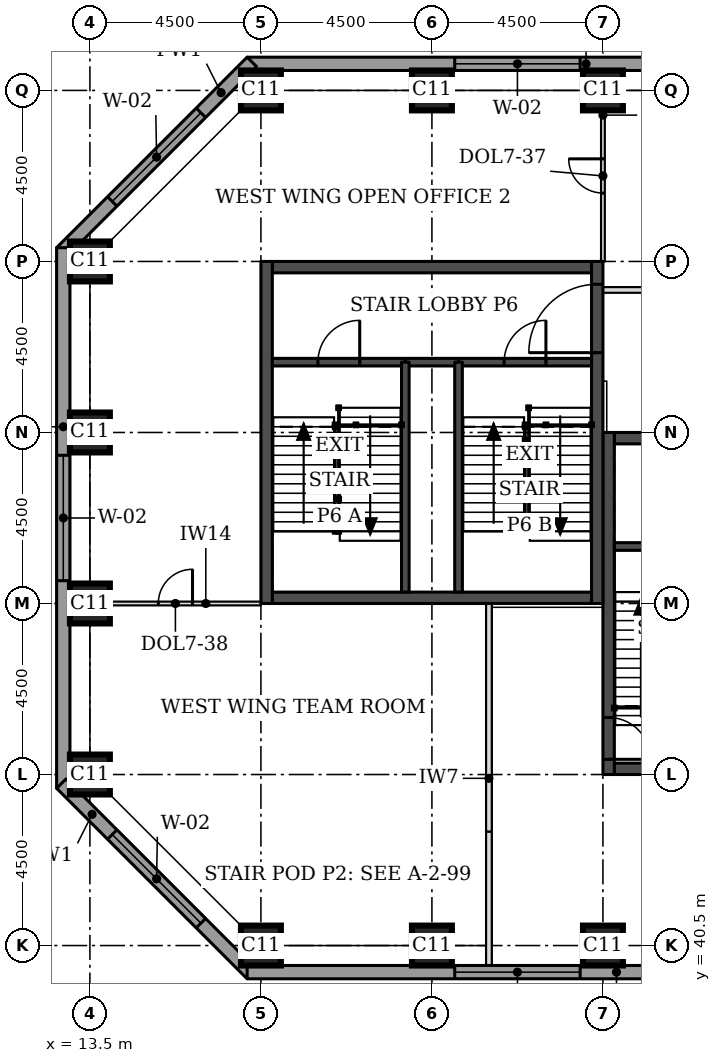
"""IFC4 building model, lengths in metres.
Left out: names, types, materials, properties, quantities, classifications, styles, units other than length and angle.
Written with IfcOpenShell. Run it as: python <this file> out.ifc"""

import sys

from ifc_helpers import new_model, si_unit, direction, frame, frame_2d, origin, origin_2d, place, context, subcontext, project, spatial, rectangle, extrude, element, fill, save


model = new_model("IFC4")
c1 = context("Model", 3, precision=1e-05, world=origin(), true_north=direction((0.0, 1.0)))
c2 = subcontext(c1, "Body", "Model", "MODEL_VIEW")
j1 = project(units=[si_unit("LENGTHUNIT", "METRE"), si_unit("PLANEANGLEUNIT", "RADIAN")], contexts=[c1])
p1 = place(None, origin())
s1 = spatial("IfcSite", under=j1, at=p1, CompositionType="ELEMENT")
p2 = place(p1, origin())
s2 = spatial("IfcBuilding", under=s1, at=p2, CompositionType="ELEMENT")
p3 = place(p2, frame((0.0, 0.0, 130.7)))
s3 = spatial("IfcBuildingStorey", under=s2, at=p3, CompositionType="ELEMENT", Elevation=130.7)
for number, where, z_axis, x_axis in (
    (1, (18.0, 40.5, 0.0), (0.0, 0.0, 1.0), (1.0, 0.0, 0.0)),
    (2, (22.5, 40.5, 0.0), (0.0, 0.0, 1.0), (1.0, 0.0, 0.0)),
    (3, (27.0, 40.5, 0.0), (0.0, 0.0, 1.0), (1.0, 0.0, 0.0)),
    (4, (13.5, 45.0, 0.0), (0.0, 0.0, 1.0), (1.0, 0.0, 0.0)),
    (5, (13.5, 49.5, 0.0), (0.0, 0.0, 1.0), (1.0, 0.0, 0.0)),
    (6, (13.5, 54.0, 0.0), (0.0, 0.0, 1.0), (1.0, 0.0, 0.0)),
    (7, (13.5, 58.5, 0.0), (0.0, 0.0, 1.0), (1.0, 0.0, 0.0)),
    (8, (18.0, 63.0, 0.0), (0.0, 0.0, 1.0), (1.0, 0.0, 0.0)),
    (9, (22.5, 63.0, 0.0), (0.0, 0.0, 1.0), (1.0, 0.0, 0.0)),
    (10, (27.0, 63.0, 0.0), (0.0, 0.0, 1.0), (1.0, 0.0, 0.0)),
):
    element("IfcColumn", number, at=place(p3, frame(where, z_axis=z_axis, x_axis=x_axis)), inside=s3, PredefinedType="COLUMN", context=c2, shape_type="SweptSolid", body=[
        extrude(rectangle(XDim=1.05, YDim=1.05, at=origin_2d()), origin(), (0.0, 0.0, 1.0), 3.7),
    ])
p4 = place(p3, frame((27.3, 45.15, 0.0), z_axis=(0.0, 0.0, 1.0), x_axis=(1.0, 0.0, 0.0)))
e11 = element("IfcWall", 11, at=p4, inside=s3, PredefinedType="SHEAR", context=c2, shape_type="SweptSolid", body=[
    extrude(rectangle(XDim=8.4, YDim=0.3, at=frame_2d((4.2, 0.0))), origin(), (0.0, 0.0, 1.0), 3.7),
])
p5 = place(p4, frame((5.2, 0.0, 0.0)))
e12 = element("IfcOpeningElement", 12, at=p5, cuts=e11, PredefinedType="OPENING", context=c2, shape_type="SweptSolid", body=[
    extrude(rectangle(XDim=1.0, YDim=2.1, at=frame_2d((0.5, 1.05))), frame((0.0, 0.16, 0.0), z_axis=(0.0, -1.0, 0.0), x_axis=(1.0, 0.0, 0.0)), (0.0, 0.0, 1.0), 0.32),
])
p6 = place(p3, frame((27.3, 53.85, 0.0), z_axis=(0.0, 0.0, 1.0), x_axis=(1.0, 0.0, 0.0)))
e13 = element("IfcWall", 13, at=p6, inside=s3, PredefinedType="SHEAR", context=c2, shape_type="SweptSolid", body=[
    extrude(rectangle(XDim=8.4, YDim=0.3, at=frame_2d((4.2, 0.0))), origin(), (0.0, 0.0, 1.0), 3.7),
])
p7 = place(p6, frame((6.4, 0.0, 0.0)))
e14 = element("IfcOpeningElement", 14, at=p7, cuts=e13, PredefinedType="OPENING", context=c2, shape_type="SweptSolid", body=[
    extrude(rectangle(XDim=1.1, YDim=2.1, at=frame_2d((0.55, 1.05))), frame((0.0, 0.16, 0.0), z_axis=(0.0, -1.0, 0.0), x_axis=(1.0, 0.0, 0.0)), (0.0, 0.0, 1.0), 0.32),
])
p8 = place(p3, frame((27.15, 45.0, 0.0), z_axis=(0.0, 0.0, 1.0), x_axis=(0.0, 1.0, 0.0)))
e15 = element("IfcWall", 15, at=p8, inside=s3, PredefinedType="SHEAR", context=c2, shape_type="SweptSolid", body=[
    extrude(rectangle(XDim=9.0, YDim=0.3, at=frame_2d((4.5, 0.0))), origin(), (0.0, 0.0, 1.0), 3.7),
])
p9 = place(p8, frame((0.4, 0.0, 0.0)))
e16 = element("IfcOpeningElement", 16, at=p9, cuts=e15, PredefinedType="OPENING", context=c2, shape_type="SweptSolid", body=[
    extrude(rectangle(XDim=1.1, YDim=2.1, at=frame_2d((0.55, 1.05))), frame((0.0, 0.16, 0.0), z_axis=(0.0, -1.0, 0.0), x_axis=(1.0, 0.0, 0.0)), (0.0, 0.0, 1.0), 0.32),
])
for number, where, z_axis, x_axis in (
    (17, (18.3, 49.65, 0.0), (0.0, 0.0, 1.0), (1.0, 0.0, 0.0)),
    (18, (18.3, 58.35, 0.0), (0.0, 0.0, 1.0), (1.0, 0.0, 0.0)),
):
    element("IfcWall", number, at=place(p3, frame(where, z_axis=z_axis, x_axis=x_axis)), inside=s3, PredefinedType="SHEAR", context=c2, shape_type="SweptSolid", body=[
        extrude(rectangle(XDim=8.4, YDim=0.3, at=frame_2d((4.2, 0.0))), origin(), (0.0, 0.0, 1.0), 3.7),
    ])
p10 = place(p3, frame((18.15, 49.5, 0.0), z_axis=(0.0, 0.0, 1.0), x_axis=(0.0, 1.0, 0.0)))
e19 = element("IfcWall", 19, at=p10, inside=s3, PredefinedType="SHEAR", context=c2, shape_type="SweptSolid", body=[
    extrude(rectangle(XDim=9.0, YDim=0.3, at=frame_2d((4.5, 0.0))), origin(), (0.0, 0.0, 1.0), 3.7),
])
p11 = place(p3, frame((26.85, 49.5, 0.0), z_axis=(0.0, 0.0, 1.0), x_axis=(0.0, 1.0, 0.0)))
e20 = element("IfcWall", 20, at=p11, inside=s3, PredefinedType="SHEAR", context=c2, shape_type="SweptSolid", body=[
    extrude(rectangle(XDim=9.0, YDim=0.3, at=frame_2d((4.5, 0.0))), origin(), (0.0, 0.0, 1.0), 3.7),
])
p12 = place(p11, frame((6.6, 0.0, 0.0)))
e21 = element("IfcOpeningElement", 21, at=p12, cuts=e20, PredefinedType="OPENING", context=c2, shape_type="SweptSolid", body=[
    extrude(rectangle(XDim=1.8, YDim=2.1, at=frame_2d((0.9, 1.05))), frame((0.0, 0.16, 0.0), z_axis=(0.0, -1.0, 0.0), x_axis=(1.0, 0.0, 0.0)), (0.0, 0.0, 1.0), 0.32),
])
p13 = place(p3, frame((35.475, 63.7, 0.0), z_axis=(0.0, 0.0, 1.0), x_axis=(-1.0, 0.0, 0.0)))
e22 = element("IfcWall", 22, at=p13, inside=s3, PredefinedType="STANDARD", context=c2, shape_type="SweptSolid", body=[
    extrude(rectangle(XDim=17.837, YDim=0.35, at=frame_2d((8.919, 0.0))), origin(), (0.0, 0.0, 1.0), 3.525),
])
p14 = place(p13, frame((0.5, 0.0, 0.9)))
e23 = element("IfcOpeningElement", 23, at=p14, cuts=e22, PredefinedType="OPENING", context=c2, shape_type="SweptSolid", body=[
    extrude(rectangle(XDim=3.3, YDim=1.9, at=frame_2d((1.65, 0.95))), frame((0.0, 0.185, 0.0), z_axis=(0.0, -1.0, 0.0), x_axis=(1.0, 0.0, 0.0)), (0.0, 0.0, 1.0), 0.37),
])
p15 = place(p13, frame((9.075, 0.0, 0.9)))
e24 = element("IfcOpeningElement", 24, at=p15, cuts=e22, PredefinedType="OPENING", context=c2, shape_type="SweptSolid", body=[
    extrude(rectangle(XDim=3.3, YDim=1.9, at=frame_2d((1.65, 0.95))), frame((0.0, 0.185, 0.0), z_axis=(0.0, -1.0, 0.0), x_axis=(1.0, 0.0, 0.0)), (0.0, 0.0, 1.0), 0.37),
])
p16 = place(p3, frame((17.761, 63.751, 0.0), z_axis=(0.0, 0.0, 1.0), x_axis=(-0.707106781187, -0.707106781187, 0.0)))
e25 = element("IfcWall", 25, at=p16, inside=s3, PredefinedType="STANDARD", context=c2, shape_type="SweptSolid", body=[
    extrude(rectangle(XDim=7.089, YDim=0.35, at=frame_2d((3.544, 0.0))), origin(), (0.0, 0.0, 1.0), 3.525),
])
p17 = place(p16, frame((1.894, 0.0, 0.9)))
e26 = element("IfcOpeningElement", 26, at=p17, cuts=e25, PredefinedType="OPENING", context=c2, shape_type="SweptSolid", body=[
    extrude(rectangle(XDim=3.3, YDim=1.9, at=frame_2d((1.65, 0.95))), frame((0.0, 0.185, 0.0), z_axis=(0.0, -1.0, 0.0), x_axis=(1.0, 0.0, 0.0)), (0.0, 0.0, 1.0), 0.37),
])
p18 = place(p3, frame((12.8, 58.862, 0.0), z_axis=(0.0, 0.0, 1.0), x_axis=(0.0, -1.0, 0.0)))
e27 = element("IfcWall", 27, at=p18, inside=s3, PredefinedType="STANDARD", context=c2, shape_type="SweptSolid", body=[
    extrude(rectangle(XDim=14.225, YDim=0.35, at=frame_2d((7.112, 0.0))), origin(), (0.0, 0.0, 1.0), 3.525),
])
p19 = place(p18, frame((5.462, 0.0, 0.9)))
e28 = element("IfcOpeningElement", 28, at=p19, cuts=e27, PredefinedType="OPENING", context=c2, shape_type="SweptSolid", body=[
    extrude(rectangle(XDim=3.3, YDim=1.9, at=frame_2d((1.65, 0.95))), frame((0.0, 0.185, 0.0), z_axis=(0.0, -1.0, 0.0), x_axis=(1.0, 0.0, 0.0)), (0.0, 0.0, 1.0), 0.37),
])
p20 = place(p3, frame((12.749, 44.761, 0.0), z_axis=(0.0, 0.0, 1.0), x_axis=(0.707106781187, -0.707106781187, 0.0)))
e29 = element("IfcWall", 29, at=p20, inside=s3, PredefinedType="STANDARD", context=c2, shape_type="SweptSolid", body=[
    extrude(rectangle(XDim=7.089, YDim=0.35, at=frame_2d((3.544, 0.0))), origin(), (0.0, 0.0, 1.0), 3.525),
])
p21 = place(p20, frame((1.894, 0.0, 0.9)))
e30 = element("IfcOpeningElement", 30, at=p21, cuts=e29, PredefinedType="OPENING", context=c2, shape_type="SweptSolid", body=[
    extrude(rectangle(XDim=3.3, YDim=1.9, at=frame_2d((1.65, 0.95))), frame((0.0, 0.185, 0.0), z_axis=(0.0, -1.0, 0.0), x_axis=(1.0, 0.0, 0.0)), (0.0, 0.0, 1.0), 0.37),
])
p22 = place(p3, frame((17.638, 39.8, 0.0), z_axis=(0.0, 0.0, 1.0), x_axis=(1.0, 0.0, 0.0)))
e31 = element("IfcWall", 31, at=p22, inside=s3, PredefinedType="STANDARD", context=c2, shape_type="SweptSolid", body=[
    extrude(rectangle(XDim=17.837, YDim=0.35, at=frame_2d((8.919, 0.0))), origin(), (0.0, 0.0, 1.0), 3.525),
])
p23 = place(p22, frame((5.462, 0.0, 0.9)))
e32 = element("IfcOpeningElement", 32, at=p23, cuts=e31, PredefinedType="OPENING", context=c2, shape_type="SweptSolid", body=[
    extrude(rectangle(XDim=3.3, YDim=1.9, at=frame_2d((1.65, 0.95))), frame((0.0, 0.185, 0.0), z_axis=(0.0, -1.0, 0.0), x_axis=(1.0, 0.0, 0.0)), (0.0, 0.0, 1.0), 0.37),
])
p24 = place(p22, frame((14.037, 0.0, 0.9)))
e33 = element("IfcOpeningElement", 33, at=p24, cuts=e31, PredefinedType="OPENING", context=c2, shape_type="SweptSolid", body=[
    extrude(rectangle(XDim=3.3, YDim=1.9, at=frame_2d((1.65, 0.95))), frame((0.0, 0.185, 0.0), z_axis=(0.0, -1.0, 0.0), x_axis=(1.0, 0.0, 0.0)), (0.0, 0.0, 1.0), 0.37),
])
p25 = place(p3, frame((24.0, 39.975, 0.0), z_axis=(0.0, 0.0, 1.0), x_axis=(0.0, 1.0, 0.0)))
e34 = element("IfcWall", 34, at=p25, inside=s3, PredefinedType="PARTITIONING", context=c2, shape_type="SweptSolid", body=[
    extrude(rectangle(XDim=3.525, YDim=0.15, at=frame_2d((1.762, 0.0))), origin(), (0.0, 0.0, 1.0), 3.55),
])
p26 = place(p3, frame((24.0, 43.5, 0.0), z_axis=(0.0, 0.0, 1.0), x_axis=(0.0, 1.0, 0.0)))
e35 = element("IfcWall", 35, at=p26, inside=s3, PredefinedType="PARTITIONING", context=c2, shape_type="SweptSolid", body=[
    extrude(rectangle(XDim=6.0, YDim=0.15, at=frame_2d((3.0, 0.0))), origin(), (0.0, 0.0, 1.0), 3.55),
])
p27 = place(p3, frame((27.0, 63.0, 0.0), z_axis=(0.0, 0.0, 1.0), x_axis=(0.0, -1.0, 0.0)))
e36 = element("IfcWall", 36, at=p27, inside=s3, PredefinedType="PARTITIONING", context=c2, shape_type="SweptSolid", body=[
    extrude(rectangle(XDim=4.5, YDim=0.1, at=frame_2d((2.25, 0.0))), origin(), (0.0, 0.0, 1.0), 3.55),
])
p28 = place(p27, frame((1.8, 0.0, 0.0)))
e37 = element("IfcOpeningElement", 37, at=p28, cuts=e36, PredefinedType="OPENING", context=c2, shape_type="SweptSolid", body=[
    extrude(rectangle(XDim=0.9, YDim=2.1, at=frame_2d((0.45, 1.05))), frame((0.0, 0.06, 0.0), z_axis=(0.0, -1.0, 0.0), x_axis=(1.0, 0.0, 0.0)), (0.0, 0.0, 1.0), 0.12),
])
p29 = place(p3, frame((13.5, 49.5, 0.0), z_axis=(0.0, 0.0, 1.0), x_axis=(1.0, 0.0, 0.0)))
e38 = element("IfcWall", 38, at=p29, inside=s3, PredefinedType="PARTITIONING", context=c2, shape_type="SweptSolid", body=[
    extrude(rectangle(XDim=4.5, YDim=0.1, at=frame_2d((2.25, 0.0))), origin(), (0.0, 0.0, 1.0), 3.55),
])
p30 = place(p29, frame((1.8, 0.0, 0.0)))
e39 = element("IfcOpeningElement", 39, at=p30, cuts=e38, PredefinedType="OPENING", context=c2, shape_type="SweptSolid", body=[
    extrude(rectangle(XDim=0.9, YDim=2.1, at=frame_2d((0.45, 1.05))), frame((0.0, 0.06, 0.0), z_axis=(0.0, -1.0, 0.0), x_axis=(1.0, 0.0, 0.0)), (0.0, 0.0, 1.0), 0.12),
])
p31 = place(p3, frame((27.0, 57.75, 0.0), z_axis=(0.0, 0.0, 1.0), x_axis=(1.0, 0.0, 0.0)))
e40 = element("IfcWall", 40, at=p31, inside=s3, PredefinedType="PARTITIONING", context=c2, shape_type="SweptSolid", body=[
    extrude(rectangle(XDim=2.4, YDim=0.15, at=frame_2d((1.2, 0.0))), origin(), (0.0, 0.0, 1.0), 3.55),
])
p32 = place(p3, frame((27.3, 51.0, 0.0), z_axis=(0.0, 0.0, 1.0), x_axis=(1.0, 0.0, 0.0)))
e41 = element("IfcWall", 41, at=p32, inside=s3, PredefinedType="SOLIDWALL", context=c2, shape_type="SweptSolid", body=[
    extrude(rectangle(XDim=3.0, YDim=0.2, at=frame_2d((1.5, 0.0))), origin(), (0.0, 0.0, 1.0), 3.55),
])
p33 = place(p3, frame((21.8, 55.85, 0.0), z_axis=(0.0, 0.0, 1.0), x_axis=(1.0, 0.0, 0.0)))
e42 = element("IfcWall", 42, at=p33, inside=s3, PredefinedType="SOLIDWALL", context=c2, shape_type="SweptSolid", body=[
    extrude(rectangle(XDim=1.4, YDim=0.2, at=frame_2d((0.7, 0.0))), origin(), (0.0, 0.0, 1.0), 3.55),
])
p34 = place(p3, frame((18.3, 55.85, 0.0), z_axis=(0.0, 0.0, 1.0), x_axis=(1.0, 0.0, 0.0)))
e43 = element("IfcWall", 43, at=p34, inside=s3, PredefinedType="SOLIDWALL", context=c2, shape_type="SweptSolid", body=[
    extrude(rectangle(XDim=3.5, YDim=0.2, at=frame_2d((1.75, 0.0))), origin(), (0.0, 0.0, 1.0), 3.55),
])
p35 = place(p34, frame((1.2, 0.0, 0.0)))
e44 = element("IfcOpeningElement", 44, at=p35, cuts=e43, PredefinedType="OPENING", context=c2, shape_type="SweptSolid", body=[
    extrude(rectangle(XDim=1.1, YDim=2.1, at=frame_2d((0.55, 1.05))), frame((0.0, 0.11, 0.0), z_axis=(0.0, -1.0, 0.0), x_axis=(1.0, 0.0, 0.0)), (0.0, 0.0, 1.0), 0.22),
])
p36 = place(p3, frame((23.2, 55.85, 0.0), z_axis=(0.0, 0.0, 1.0), x_axis=(1.0, 0.0, 0.0)))
e45 = element("IfcWall", 45, at=p36, inside=s3, PredefinedType="SOLIDWALL", context=c2, shape_type="SweptSolid", body=[
    extrude(rectangle(XDim=3.5, YDim=0.2, at=frame_2d((1.75, 0.0))), origin(), (0.0, 0.0, 1.0), 3.55),
])
p37 = place(p36, frame((1.2, 0.0, 0.0)))
e46 = element("IfcOpeningElement", 46, at=p37, cuts=e45, PredefinedType="OPENING", context=c2, shape_type="SweptSolid", body=[
    extrude(rectangle(XDim=1.1, YDim=2.1, at=frame_2d((0.55, 1.05))), frame((0.0, 0.11, 0.0), z_axis=(0.0, -1.0, 0.0), x_axis=(1.0, 0.0, 0.0)), (0.0, 0.0, 1.0), 0.22),
])
for number, where, z_axis, x_axis in (
    (47, (21.8, 49.8, 0.0), (0.0, 0.0, 1.0), (0.0, 1.0, 0.0)),
    (48, (23.2, 49.8, 0.0), (0.0, 0.0, 1.0), (0.0, 1.0, 0.0)),
):
    element("IfcWall", number, at=place(p3, frame(where, z_axis=z_axis, x_axis=x_axis)), inside=s3, PredefinedType="SOLIDWALL", context=c2, shape_type="SweptSolid", body=[
        extrude(rectangle(XDim=6.05, YDim=0.2, at=frame_2d((3.025, 0.0))), origin(), (0.0, 0.0, 1.0), 3.55),
    ])
p38 = place(p15, origin())
e49 = element("IfcWindow", 49, at=p38, inside=s3, PartitioningType="SINGLE_PANEL", PredefinedType="WINDOW", context=c2, shape_type="SweptSolid", body=[
    extrude(rectangle(XDim=3.3, YDim=1.9, at=frame_2d((1.65, 0.95))), frame((0.0, 0.085, 0.0), z_axis=(0.0, -1.0, 0.0), x_axis=(1.0, 0.0, 0.0)), (0.0, 0.0, 1.0), 0.06),
])
fill(e24, e49)
p39 = place(p17, origin())
e50 = element("IfcWindow", 50, at=p39, inside=s3, PartitioningType="SINGLE_PANEL", PredefinedType="WINDOW", context=c2, shape_type="SweptSolid", body=[
    extrude(rectangle(XDim=3.3, YDim=1.9, at=frame_2d((1.65, 0.95))), frame((0.0, 0.085, 0.0), z_axis=(0.0, -1.0, 0.0), x_axis=(1.0, 0.0, 0.0)), (0.0, 0.0, 1.0), 0.06),
])
fill(e26, e50)
p40 = place(p19, origin())
e51 = element("IfcWindow", 51, at=p40, inside=s3, PartitioningType="SINGLE_PANEL", PredefinedType="WINDOW", context=c2, shape_type="SweptSolid", body=[
    extrude(rectangle(XDim=3.3, YDim=1.9, at=frame_2d((1.65, 0.95))), frame((0.0, 0.085, 0.0), z_axis=(0.0, -1.0, 0.0), x_axis=(1.0, 0.0, 0.0)), (0.0, 0.0, 1.0), 0.06),
])
fill(e28, e51)
p41 = place(p21, origin())
e52 = element("IfcWindow", 52, at=p41, inside=s3, PartitioningType="SINGLE_PANEL", PredefinedType="WINDOW", context=c2, shape_type="SweptSolid", body=[
    extrude(rectangle(XDim=3.3, YDim=1.9, at=frame_2d((1.65, 0.95))), frame((0.0, 0.085, 0.0), z_axis=(0.0, -1.0, 0.0), x_axis=(1.0, 0.0, 0.0)), (0.0, 0.0, 1.0), 0.06),
])
fill(e30, e52)
p42 = place(p23, origin())
e53 = element("IfcWindow", 53, at=p42, inside=s3, PartitioningType="SINGLE_PANEL", PredefinedType="WINDOW", context=c2, shape_type="SweptSolid", body=[
    extrude(rectangle(XDim=3.3, YDim=1.9, at=frame_2d((1.65, 0.95))), frame((0.0, 0.085, 0.0), z_axis=(0.0, -1.0, 0.0), x_axis=(1.0, 0.0, 0.0)), (0.0, 0.0, 1.0), 0.06),
])
fill(e32, e53)
p43 = place(p28, frame((0.9, 0.0, 0.0), z_axis=(0.0, 0.0, 1.0), x_axis=(-1.0, 0.0, 0.0)))
e54 = element("IfcDoor", 54, at=p43, inside=s3, OperationType="SINGLE_SWING_RIGHT", PredefinedType="DOOR", context=c2, shape_type="SweptSolid", body=[
    extrude(rectangle(XDim=0.9, YDim=2.1, at=frame_2d((0.45, 1.05))), frame((0.0, 0.025, 0.0), z_axis=(0.0, -1.0, 0.0), x_axis=(1.0, 0.0, 0.0)), (0.0, 0.0, 1.0), 0.05),
])
fill(e37, e54)
p44 = place(p30, origin())
e55 = element("IfcDoor", 55, at=p44, inside=s3, OperationType="SINGLE_SWING_RIGHT", PredefinedType="DOOR", context=c2, shape_type="SweptSolid", body=[
    extrude(rectangle(XDim=0.9, YDim=2.1, at=frame_2d((0.45, 1.05))), frame((0.0, 0.025, 0.0), z_axis=(0.0, -1.0, 0.0), x_axis=(1.0, 0.0, 0.0)), (0.0, 0.0, 1.0), 0.05),
])
fill(e39, e55)
p45 = place(p9, frame((1.1, 0.0, 0.0), z_axis=(0.0, 0.0, 1.0), x_axis=(-1.0, 0.0, 0.0)))
e56 = element("IfcDoor", 56, at=p45, inside=s3, OperationType="SINGLE_SWING_RIGHT", PredefinedType="DOOR", context=c2, shape_type="SweptSolid", body=[
    extrude(rectangle(XDim=1.1, YDim=2.1, at=frame_2d((0.55, 1.05))), frame((0.0, 0.025, 0.0), z_axis=(0.0, -1.0, 0.0), x_axis=(1.0, 0.0, 0.0)), (0.0, 0.0, 1.0), 0.05),
])
fill(e16, e56)
p46 = place(p35, origin())
e57 = element("IfcDoor", 57, at=p46, inside=s3, OperationType="SINGLE_SWING_RIGHT", PredefinedType="DOOR", context=c2, shape_type="SweptSolid", body=[
    extrude(rectangle(XDim=1.1, YDim=2.1, at=frame_2d((0.55, 1.05))), frame((0.0, 0.025, 0.0), z_axis=(0.0, -1.0, 0.0), x_axis=(1.0, 0.0, 0.0)), (0.0, 0.0, 1.0), 0.05),
])
fill(e44, e57)
p47 = place(p37, origin())
e58 = element("IfcDoor", 58, at=p47, inside=s3, OperationType="SINGLE_SWING_RIGHT", PredefinedType="DOOR", context=c2, shape_type="SweptSolid", body=[
    extrude(rectangle(XDim=1.1, YDim=2.1, at=frame_2d((0.55, 1.05))), frame((0.0, 0.025, 0.0), z_axis=(0.0, -1.0, 0.0), x_axis=(1.0, 0.0, 0.0)), (0.0, 0.0, 1.0), 0.05),
])
fill(e46, e58)
p48 = place(p12, origin())
e59 = element("IfcDoor", 59, at=p48, inside=s3, OperationType="SINGLE_SWING_LEFT", PredefinedType="DOOR", context=c2, shape_type="SweptSolid", body=[
    extrude(rectangle(XDim=1.8, YDim=2.1, at=frame_2d((0.9, 1.05))), frame((0.0, 0.025, 0.0), z_axis=(0.0, -1.0, 0.0), x_axis=(1.0, 0.0, 0.0)), (0.0, 0.0, 1.0), 0.05),
])
fill(e21, e59)
save(model, sys.argv[1])
